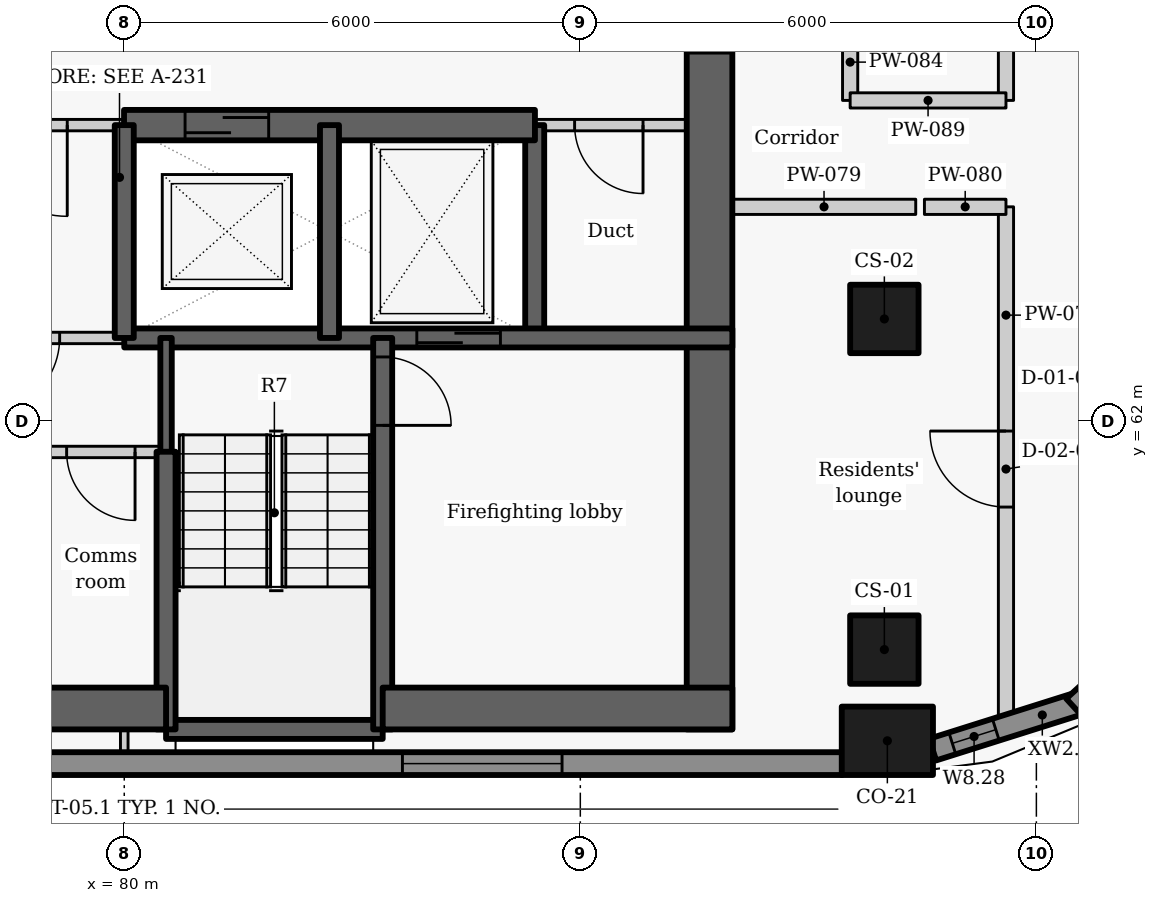
"""IFC4 building model, lengths in metres.
Left out: names, types, materials, properties, quantities, classifications, styles, units other than length and angle.
Written with IfcOpenShell. Run it as: python <this file> out.ifc"""

import sys

from ifc_helpers import new_model, si_unit, direction, frame, frame_2d, origin, origin_2d, place, context, subcontext, project, spatial, rectangle, extrude, element, fill, save


model = new_model("IFC4")
c1 = context("Model", 3, precision=1e-05, world=origin(), true_north=direction((0.0, 1.0)))
c2 = subcontext(c1, "Body", "Model", "MODEL_VIEW")
j1 = project(units=[si_unit("LENGTHUNIT", "METRE"), si_unit("PLANEANGLEUNIT", "RADIAN")], contexts=[c1])
p1 = place(None, origin())
s1 = spatial("IfcSite", under=j1, at=p1, CompositionType="ELEMENT")
p2 = place(p1, origin())
s2 = spatial("IfcBuilding", under=s1, at=p2, CompositionType="ELEMENT")
p3 = place(p2, frame((0.0, 0.0, 176.7)))
s3 = spatial("IfcBuildingStorey", under=s2, at=p3, CompositionType="ELEMENT", Elevation=176.7)
p4 = place(p3, frame((90.04, 57.8, 0.0), z_axis=(0.0, 0.0, 1.0), x_axis=(1.0, 0.0, 0.0)))
e1 = element("IfcColumn", 1, at=p4, inside=s3, PredefinedType="COLUMN", context=c2, shape_type="SweptSolid", body=[
    extrude(rectangle(XDim=1.2, YDim=0.9, at=origin_2d()), origin(), (0.0, 0.0, 1.0), 3.3),
])
for number, where, z_axis, x_axis in (
    (2, (90.0, 59.0, 0.0), (0.0, 0.0, 1.0), (0.0, 1.0, 0.0)),
    (3, (90.0, 63.35, 0.0), (0.0, 0.0, 1.0), (0.0, 1.0, 0.0)),
):
    element("IfcColumn", number, at=place(p3, frame(where, z_axis=z_axis, x_axis=x_axis)), inside=s3, PredefinedType="COLUMN", context=c2, shape_type="SweptSolid", body=[
        extrude(rectangle(XDim=0.9, YDim=0.9, at=origin_2d()), origin(), (0.0, 0.0, 1.0), 3.3),
    ])
p5 = place(p3, frame((70.551, 57.5, 0.0), z_axis=(0.0, 0.0, 1.0), x_axis=(1.0, 0.0, 0.0)))
e4 = element("IfcWall", 4, at=p5, inside=s3, PredefinedType="SOLIDWALL", context=c2, shape_type="SweptSolid", body=[
    extrude(rectangle(XDim=18.893, YDim=0.3, at=frame_2d((9.446, 0.0))), origin(), (0.0, 0.0, 1.0), 2.425),
])
p6 = place(p5, frame((3.687, 0.0, 0.9)))
e5 = element("IfcOpeningElement", 5, at=p6, cuts=e4, PredefinedType="OPENING", context=c2, shape_type="SweptSolid", body=[
    extrude(rectangle(XDim=2.1, YDim=1.1, at=frame_2d((1.05, 0.55))), frame((0.0, 0.16, 0.0), z_axis=(0.0, -1.0, 0.0), x_axis=(1.0, 0.0, 0.0)), (0.0, 0.0, 1.0), 0.32),
])
p7 = place(p5, frame((13.109, 0.0, 0.9)))
e6 = element("IfcOpeningElement", 6, at=p7, cuts=e4, PredefinedType="OPENING", context=c2, shape_type="SweptSolid", body=[
    extrude(rectangle(XDim=2.1, YDim=1.1, at=frame_2d((1.05, 0.55))), frame((0.0, 0.16, 0.0), z_axis=(0.0, -1.0, 0.0), x_axis=(1.0, 0.0, 0.0)), (0.0, 0.0, 1.0), 0.32),
])
p8 = place(p3, frame((90.636, 57.685, 0.0), z_axis=(0.0, 0.0, 1.0), x_axis=(0.95368324118, 0.300812691707, 0.0)))
e7 = element("IfcWall", 7, at=p8, inside=s3, PredefinedType="SOLIDWALL", context=c2, shape_type="SweptSolid", body=[
    extrude(rectangle(XDim=2.053, YDim=0.3, at=frame_2d((1.027, 0.0))), origin(), (0.0, 0.0, 1.0), 2.425),
])
p9 = place(p8, frame((0.271, 0.0, 0.9)))
e8 = element("IfcOpeningElement", 8, at=p9, cuts=e7, PredefinedType="OPENING", context=c2, shape_type="SweptSolid", body=[
    extrude(rectangle(XDim=0.6, YDim=1.1, at=frame_2d((0.3, 0.55))), frame((0.0, 0.16, 0.0), z_axis=(0.0, -1.0, 0.0), x_axis=(1.0, 0.0, 0.0)), (0.0, 0.0, 1.0), 0.32),
])
p10 = place(p3, frame((92.494, 58.244, 0.0), z_axis=(0.0, 0.0, 1.0), x_axis=(0.73764876128, 0.675184645102, 0.0)))
e9 = element("IfcWall", 9, at=p10, inside=s3, PredefinedType="SOLIDWALL", context=c2, shape_type="SweptSolid", body=[
    extrude(rectangle(XDim=2.048, YDim=0.3, at=frame_2d((1.024, 0.0))), origin(), (0.0, 0.0, 1.0), 2.425),
])
p11 = place(p3, frame((85.4, 63.1, -0.41), z_axis=(0.0, 0.0, 1.0), x_axis=(0.0, 1.0, 0.0)))
e10 = element("IfcWall", 10, at=p11, inside=s3, PredefinedType="SHEAR", context=c2, shape_type="SweptSolid", body=[
    extrude(rectangle(XDim=2.8, YDim=0.25, at=frame_2d((1.4, 0.0))), origin(), (0.0, 0.0, 1.0), 3.435),
])
p12 = place(p3, frame((87.7, 72.2, -0.41), z_axis=(0.0, 0.0, 1.0), x_axis=(0.0, -1.0, 0.0)))
e11 = element("IfcWall", 11, at=p12, inside=s3, PredefinedType="SHEAR", context=c2, shape_type="SweptSolid", body=[
    extrude(rectangle(XDim=14.25, YDim=0.6, at=frame_2d((7.125, 0.0))), origin(), (0.0, 0.0, 1.0), 3.435),
])
p13 = place(p12, frame((3.852, 0.0, 0.41)))
e12 = element("IfcOpeningElement", 12, at=p13, cuts=e11, PredefinedType="OPENING", context=c2, shape_type="SweptSolid", body=[
    extrude(rectangle(XDim=1.5, YDim=2.1, at=frame_2d((0.75, 1.05))), frame((0.0, 0.31, 0.0), z_axis=(0.0, -1.0, 0.0), x_axis=(1.0, 0.0, 0.0)), (0.0, 0.0, 1.0), 0.62),
])
p14 = place(p3, frame((80.003, 65.9, 0.0), z_axis=(0.0, 0.0, 1.0), x_axis=(-1.0, 0.0, 0.0)))
e13 = element("IfcWall", 13, at=p14, inside=s3, PredefinedType="PARTITIONING", context=c2, shape_type="SweptSolid", body=[
    extrude(rectangle(XDim=2.706, YDim=0.15, at=frame_2d((1.353, 0.0))), origin(), (0.0, 0.0, 1.0), 3.025),
])
p15 = place(p14, frame((0.753, 0.0, 0.0)))
e14 = element("IfcOpeningElement", 14, at=p15, cuts=e13, PredefinedType="OPENING", context=c2, shape_type="SweptSolid", body=[
    extrude(rectangle(XDim=1.2, YDim=2.1, at=frame_2d((0.6, 1.05))), frame((0.0, 0.085, 0.0), z_axis=(0.0, -1.0, 0.0), x_axis=(1.0, 0.0, 0.0)), (0.0, 0.0, 1.0), 0.17),
])
p16 = place(p3, frame((88.0, 65.9, 0.0), z_axis=(0.0, 0.0, 1.0), x_axis=(-1.0, 0.0, 0.0)))
e15 = element("IfcWall", 15, at=p16, inside=s3, PredefinedType="PARTITIONING", context=c2, shape_type="SweptSolid", body=[
    extrude(rectangle(XDim=2.603, YDim=0.15, at=frame_2d((1.302, 0.0))), origin(), (0.0, 0.0, 1.0), 3.025),
])
p17 = place(p16, frame((1.175, 0.0, 0.0)))
e16 = element("IfcOpeningElement", 16, at=p17, cuts=e15, PredefinedType="OPENING", context=c2, shape_type="SweptSolid", body=[
    extrude(rectangle(XDim=0.9, YDim=2.1, at=frame_2d((0.45, 1.05))), frame((0.0, 0.085, 0.0), z_axis=(0.0, -1.0, 0.0), x_axis=(1.0, 0.0, 0.0)), (0.0, 0.0, 1.0), 0.17),
])
p18 = place(p3, frame((79.997, 65.9, -0.41), z_axis=(0.0, 0.0, 1.0), x_axis=(1.0, 0.0, 0.0)))
e17 = element("IfcWall", 17, at=p18, inside=s3, PredefinedType="SHEAR", context=c2, shape_type="SweptSolid", body=[
    extrude(rectangle(XDim=5.406, YDim=0.4, at=frame_2d((2.703, 0.0))), origin(), (0.0, 0.0, 1.0), 3.435),
])
p19 = place(p18, frame((0.803, 0.0, 0.41)))
e18 = element("IfcOpeningElement", 18, at=p19, cuts=e17, PredefinedType="OPENING", context=c2, shape_type="SweptSolid", body=[
    extrude(rectangle(XDim=1.1, YDim=2.1, at=frame_2d((0.55, 1.05))), frame((0.0, 0.21, 0.0), z_axis=(0.0, -1.0, 0.0), x_axis=(1.0, 0.0, 0.0)), (0.0, 0.0, 1.0), 0.42),
])
p20 = place(p3, frame((80.0, 63.1, -0.41), z_axis=(0.0, 0.0, 1.0), x_axis=(1.0, 0.0, 0.0)))
e19 = element("IfcWall", 19, at=p20, inside=s3, PredefinedType="SHEAR", context=c2, shape_type="SweptSolid", body=[
    extrude(rectangle(XDim=8.0, YDim=0.25, at=frame_2d((4.0, 0.0))), origin(), (0.0, 0.0, 1.0), 3.435),
])
p21 = place(p20, frame((3.849, 0.0, 0.41)))
e20 = element("IfcOpeningElement", 20, at=p21, cuts=e19, PredefinedType="OPENING", context=c2, shape_type="SweptSolid", body=[
    extrude(rectangle(XDim=1.1, YDim=2.1, at=frame_2d((0.55, 1.05))), frame((0.0, 0.135, 0.0), z_axis=(0.0, -1.0, 0.0), x_axis=(1.0, 0.0, 0.0)), (0.0, 0.0, 1.0), 0.27),
])
p22 = place(p3, frame((80.0, 63.1, -0.41), z_axis=(0.0, 0.0, 1.0), x_axis=(0.0, 1.0, 0.0)))
e21 = element("IfcWall", 21, at=p22, inside=s3, PredefinedType="SHEAR", context=c2, shape_type="SweptSolid", body=[
    extrude(rectangle(XDim=2.8, YDim=0.25, at=frame_2d((1.4, 0.0))), origin(), (0.0, 0.0, 1.0), 3.435),
])
p23 = place(p3, frame((80.0, 63.1, 0.0), z_axis=(0.0, 0.0, 1.0), x_axis=(-1.0, 0.0, 0.0)))
e22 = element("IfcWall", 22, at=p23, inside=s3, PredefinedType="PARTITIONING", context=c2, shape_type="SweptSolid", body=[
    extrude(rectangle(XDim=2.7, YDim=0.15, at=frame_2d((1.35, 0.0))), origin(), (0.0, 0.0, 1.0), 3.025),
])
p24 = place(p23, frame((0.85, 0.0, 0.0)))
e23 = element("IfcOpeningElement", 23, at=p24, cuts=e22, PredefinedType="OPENING", context=c2, shape_type="SweptSolid", body=[
    extrude(rectangle(XDim=1.0, YDim=2.1, at=frame_2d((0.5, 1.05))), frame((0.0, 0.085, 0.0), z_axis=(0.0, -1.0, 0.0), x_axis=(1.0, 0.0, 0.0)), (0.0, 0.0, 1.0), 0.17),
])
p25 = place(p3, frame((82.7, 63.1, -0.41), z_axis=(0.0, 0.0, 1.0), x_axis=(0.0, 1.0, 0.0)))
e24 = element("IfcWall", 24, at=p25, inside=s3, PredefinedType="SHEAR", context=c2, shape_type="SweptSolid", body=[
    extrude(rectangle(XDim=2.8, YDim=0.25, at=frame_2d((1.4, 0.0))), origin(), (0.0, 0.0, 1.0), 3.435),
])
p26 = place(p3, frame((80.55, 57.95, 0.0), z_axis=(0.0, 0.0, 1.0), x_axis=(1.0, 0.0, 0.0)))
e25 = element("IfcWall", 25, at=p26, inside=s3, PredefinedType="SHEAR", context=c2, shape_type="SweptSolid", body=[
    extrude(rectangle(XDim=2.85, YDim=0.25, at=frame_2d((1.425, 0.0))), origin(), (0.0, 0.0, 1.0), 3.025),
])
p27 = place(p3, frame((83.4, 63.1, -0.41), z_axis=(0.0, 0.0, 1.0), x_axis=(0.0, -1.0, 0.0)))
e26 = element("IfcWall", 26, at=p27, inside=s3, PredefinedType="SHEAR", context=c2, shape_type="SweptSolid", body=[
    extrude(rectangle(XDim=5.15, YDim=0.25, at=frame_2d((2.575, 0.0))), origin(), (0.0, 0.0, 1.0), 3.435),
])
p28 = place(p27, frame((0.25, 0.0, 0.41)))
e27 = element("IfcOpeningElement", 27, at=p28, cuts=e26, PredefinedType="OPENING", context=c2, shape_type="SweptSolid", body=[
    extrude(rectangle(XDim=0.9, YDim=2.1, at=frame_2d((0.45, 1.05))), frame((0.0, 0.135, 0.0), z_axis=(0.0, -1.0, 0.0), x_axis=(1.0, 0.0, 0.0)), (0.0, 0.0, 1.0), 0.27),
])
p29 = place(p3, frame((80.55, 61.597, -0.41), z_axis=(0.0, 0.0, 1.0), x_axis=(0.0, 1.0, 0.0)))
e28 = element("IfcWall", 28, at=p29, inside=s3, PredefinedType="SHEAR", context=c2, shape_type="SweptSolid", body=[
    extrude(rectangle(XDim=1.503, YDim=0.15, at=frame_2d((0.751, 0.0))), origin(), (0.0, 0.0, 1.0), 3.435),
])
p30 = place(p3, frame((80.55, 57.95, -0.41), z_axis=(0.0, 0.0, 1.0), x_axis=(0.0, 1.0, 0.0)))
e29 = element("IfcWall", 29, at=p30, inside=s3, PredefinedType="SHEAR", context=c2, shape_type="SweptSolid", body=[
    extrude(rectangle(XDim=3.653, YDim=0.25, at=frame_2d((1.827, 0.0))), origin(), (0.0, 0.0, 1.0), 3.435),
])
p31 = place(p3, frame((75.35, 58.225, 0.0), z_axis=(0.0, 0.0, 1.0), x_axis=(1.0, 0.0, 0.0)))
e30 = element("IfcWall", 30, at=p31, inside=s3, PredefinedType="SHEAR", context=c2, shape_type="SweptSolid", body=[
    extrude(rectangle(XDim=5.2, YDim=0.55, at=frame_2d((2.6, 0.0))), origin(), (0.0, 0.0, 1.0), 3.025),
])
p32 = place(p3, frame((83.4, 58.225, 0.0), z_axis=(0.0, 0.0, 1.0), x_axis=(1.0, 0.0, 0.0)))
e31 = element("IfcWall", 31, at=p32, inside=s3, PredefinedType="SHEAR", context=c2, shape_type="SweptSolid", body=[
    extrude(rectangle(XDim=4.6, YDim=0.55, at=frame_2d((2.3, 0.0))), origin(), (0.0, 0.0, 1.0), 3.025),
])
p33 = place(p3, frame((80.55, 61.6, 0.0), z_axis=(0.0, 0.0, 1.0), x_axis=(-1.0, 0.0, 0.0)))
e32 = element("IfcWall", 32, at=p33, inside=s3, PredefinedType="PARTITIONING", context=c2, shape_type="SweptSolid", body=[
    extrude(rectangle(XDim=5.2, YDim=0.15, at=frame_2d((2.6, 0.0))), origin(), (0.0, 0.0, 1.0), 3.025),
])
p34 = place(p33, frame((3.866, 0.0, 0.0)))
e33 = element("IfcOpeningElement", 33, at=p34, cuts=e32, PredefinedType="OPENING", context=c2, shape_type="SweptSolid", body=[
    extrude(rectangle(XDim=0.9, YDim=2.1, at=frame_2d((0.45, 1.05))), frame((0.0, 0.085, 0.0), z_axis=(0.0, -1.0, 0.0), x_axis=(1.0, 0.0, 0.0)), (0.0, 0.0, 1.0), 0.17),
])
p35 = place(p33, frame((2.124, 0.0, 0.0)))
e34 = element("IfcOpeningElement", 34, at=p35, cuts=e32, PredefinedType="OPENING", context=c2, shape_type="SweptSolid", body=[
    extrude(rectangle(XDim=0.9, YDim=2.1, at=frame_2d((0.45, 1.05))), frame((0.0, 0.085, 0.0), z_axis=(0.0, -1.0, 0.0), x_axis=(1.0, 0.0, 0.0)), (0.0, 0.0, 1.0), 0.17),
])
p36 = place(p33, frame((0.408, 0.0, 0.0)))
e35 = element("IfcOpeningElement", 35, at=p36, cuts=e32, PredefinedType="OPENING", context=c2, shape_type="SweptSolid", body=[
    extrude(rectangle(XDim=0.9, YDim=2.1, at=frame_2d((0.45, 1.05))), frame((0.0, 0.085, 0.0), z_axis=(0.0, -1.0, 0.0), x_axis=(1.0, 0.0, 0.0)), (0.0, 0.0, 1.0), 0.17),
])
p37 = place(p3, frame((91.6, 57.926, 0.0), z_axis=(0.0, 0.0, 1.0), x_axis=(0.0, 1.0, 0.0)))
e36 = element("IfcWall", 36, at=p37, inside=s3, PredefinedType="PARTITIONING", context=c2, shape_type="SweptSolid", body=[
    extrude(rectangle(XDim=6.899, YDim=0.2, at=frame_2d((3.449, 0.0))), origin(), (0.0, 0.0, 1.0), 2.405),
])
p38 = place(p37, frame((2.949, 0.0, 0.0)))
e37 = element("IfcOpeningElement", 37, at=p38, cuts=e36, PredefinedType="OPENING", context=c2, shape_type="SweptSolid", body=[
    extrude(rectangle(XDim=1.0, YDim=2.1, at=frame_2d((0.5, 1.05))), frame((0.0, 0.11, 0.0), z_axis=(0.0, -1.0, 0.0), x_axis=(1.0, 0.0, 0.0)), (0.0, 0.0, 1.0), 0.22),
])
p39 = place(p3, frame((91.6, 66.225, 0.0), z_axis=(0.0, 0.0, 1.0), x_axis=(0.0, 1.0, 0.0)))
e38 = element("IfcWall", 38, at=p39, inside=s3, PredefinedType="PARTITIONING", context=c2, shape_type="SweptSolid", body=[
    extrude(rectangle(XDim=5.298, YDim=0.2, at=frame_2d((2.649, 0.0))), origin(), (0.0, 0.0, 1.0), 3.025),
])
p40 = place(p3, frame((88.0, 64.825, 0.0), z_axis=(0.0, 0.0, 1.0), x_axis=(1.0, 0.0, 0.0)))
e39 = element("IfcWall", 39, at=p40, inside=s3, PredefinedType="PARTITIONING", context=c2, shape_type="SweptSolid", body=[
    extrude(rectangle(XDim=2.413, YDim=0.2, at=frame_2d((1.207, 0.0))), origin(), (0.0, 0.0, 1.0), 2.505),
])
p41 = place(p3, frame((90.527, 64.825, 0.0), z_axis=(0.0, 0.0, 1.0), x_axis=(1.0, 0.0, 0.0)))
e40 = element("IfcWall", 40, at=p41, inside=s3, PredefinedType="PARTITIONING", context=c2, shape_type="SweptSolid", body=[
    extrude(rectangle(XDim=1.073, YDim=0.2, at=frame_2d((0.537, 0.0))), origin(), (0.0, 0.0, 1.0), 3.025),
])
p42 = place(p3, frame((89.55, 66.225, 0.0), z_axis=(0.0, 0.0, 1.0), x_axis=(0.0, 1.0, 0.0)))
e41 = element("IfcWall", 41, at=p42, inside=s3, PredefinedType="PARTITIONING", context=c2, shape_type="SweptSolid", body=[
    extrude(rectangle(XDim=1.008, YDim=0.2, at=frame_2d((0.504, 0.0))), origin(), (0.0, 0.0, 1.0), 3.025),
])
p43 = place(p3, frame((89.55, 66.225, 0.0), z_axis=(0.0, 0.0, 1.0), x_axis=(1.0, 0.0, 0.0)))
e42 = element("IfcWall", 42, at=p43, inside=s3, PredefinedType="PARTITIONING", context=c2, shape_type="SweptSolid", body=[
    extrude(rectangle(XDim=2.05, YDim=0.2, at=frame_2d((1.025, 0.0))), origin(), (0.0, 0.0, 1.0), 2.505),
])
p44 = place(p3, frame((80.0, 57.65, 0.0), z_axis=(0.0, 0.0, 1.0), x_axis=(0.0, 1.0, 0.0)))
e43 = element("IfcWall", 43, at=p44, inside=s3, PredefinedType="PARTITIONING", context=c2, shape_type="SweptSolid", body=[
    extrude(rectangle(XDim=0.3, YDim=0.1, at=frame_2d((0.15, 0.0))), origin(), (0.0, 0.0, 1.0), 3.025),
])
p45 = place(p7, origin())
e44 = element("IfcWindow", 44, at=p45, inside=s3, PartitioningType="SINGLE_PANEL", PredefinedType="WINDOW", context=c2, shape_type="SweptSolid", body=[
    extrude(rectangle(XDim=2.1, YDim=1.1, at=frame_2d((1.05, 0.55))), frame((0.0, 0.03, 0.0), z_axis=(0.0, -1.0, 0.0), x_axis=(1.0, 0.0, 0.0)), (0.0, 0.0, 1.0), 0.06),
])
fill(e6, e44)
p46 = place(p9, origin())
e45 = element("IfcWindow", 45, at=p46, inside=s3, PartitioningType="SINGLE_PANEL", PredefinedType="WINDOW", context=c2, shape_type="SweptSolid", body=[
    extrude(rectangle(XDim=0.6, YDim=1.1, at=frame_2d((0.3, 0.55))), frame((0.0, 0.03, 0.0), z_axis=(0.0, -1.0, 0.0), x_axis=(1.0, 0.0, 0.0)), (0.0, 0.0, 1.0), 0.06),
])
fill(e8, e45)
p47 = place(p15, origin())
e46 = element("IfcDoor", 46, at=p47, inside=s3, OperationType="DOUBLE_DOOR_SINGLE_SWING", PredefinedType="DOOR", context=c2, shape_type="SweptSolid", body=[
    extrude(rectangle(XDim=1.2, YDim=2.1, at=frame_2d((0.6, 1.05))), frame((0.0, 0.025, 0.0), z_axis=(0.0, -1.0, 0.0), x_axis=(1.0, 0.0, 0.0)), (0.0, 0.0, 1.0), 0.05),
])
fill(e14, e46)
p48 = place(p19, origin())
e47 = element("IfcDoor", 47, at=p48, inside=s3, OperationType="SLIDING_TO_LEFT", PredefinedType="DOOR", context=c2, shape_type="SweptSolid", body=[
    extrude(rectangle(XDim=1.1, YDim=2.1, at=frame_2d((0.55, 1.05))), frame((0.0, 0.025, 0.0), z_axis=(0.0, -1.0, 0.0), x_axis=(1.0, 0.0, 0.0)), (0.0, 0.0, 1.0), 0.05),
])
fill(e18, e47)
p49 = place(p21, origin())
e48 = element("IfcDoor", 48, at=p49, inside=s3, OperationType="SLIDING_TO_LEFT", PredefinedType="DOOR", context=c2, shape_type="SweptSolid", body=[
    extrude(rectangle(XDim=1.1, YDim=2.1, at=frame_2d((0.55, 1.05))), frame((0.0, 0.025, 0.0), z_axis=(0.0, -1.0, 0.0), x_axis=(1.0, 0.0, 0.0)), (0.0, 0.0, 1.0), 0.05),
])
fill(e20, e48)
p50 = place(p17, origin())
e49 = element("IfcDoor", 49, at=p50, inside=s3, OperationType="SINGLE_SWING_LEFT", PredefinedType="DOOR", context=c2, shape_type="SweptSolid", body=[
    extrude(rectangle(XDim=0.9, YDim=2.1, at=frame_2d((0.45, 1.05))), frame((0.0, 0.025, 0.0), z_axis=(0.0, -1.0, 0.0), x_axis=(1.0, 0.0, 0.0)), (0.0, 0.0, 1.0), 0.05),
])
fill(e16, e49)
p51 = place(p24, origin())
e50 = element("IfcDoor", 50, at=p51, inside=s3, OperationType="SINGLE_SWING_RIGHT", PredefinedType="DOOR", context=c2, shape_type="SweptSolid", body=[
    extrude(rectangle(XDim=1.0, YDim=2.1, at=frame_2d((0.5, 1.05))), frame((0.0, 0.025, 0.0), z_axis=(0.0, -1.0, 0.0), x_axis=(1.0, 0.0, 0.0)), (0.0, 0.0, 1.0), 0.05),
])
fill(e23, e50)
p52 = place(p36, origin())
e51 = element("IfcDoor", 51, at=p52, inside=s3, OperationType="SINGLE_SWING_LEFT", PredefinedType="DOOR", context=c2, shape_type="SweptSolid", body=[
    extrude(rectangle(XDim=0.9, YDim=2.1, at=frame_2d((0.45, 1.05))), frame((0.0, 0.025, 0.0), z_axis=(0.0, -1.0, 0.0), x_axis=(1.0, 0.0, 0.0)), (0.0, 0.0, 1.0), 0.05),
])
fill(e35, e51)
p53 = place(p28, origin())
e52 = element("IfcDoor", 52, at=p53, inside=s3, OperationType="SINGLE_SWING_RIGHT", PredefinedType="DOOR", context=c2, shape_type="SweptSolid", body=[
    extrude(rectangle(XDim=0.9, YDim=2.1, at=frame_2d((0.45, 1.05))), frame((0.0, 0.025, 0.0), z_axis=(0.0, -1.0, 0.0), x_axis=(1.0, 0.0, 0.0)), (0.0, 0.0, 1.0), 0.05),
])
fill(e27, e52)
p54 = place(p38, origin())
e53 = element("IfcDoor", 53, at=p54, inside=s3, OperationType="SINGLE_SWING_RIGHT", PredefinedType="DOOR", context=c2, shape_type="SweptSolid", body=[
    extrude(rectangle(XDim=1.0, YDim=2.1, at=frame_2d((0.5, 1.05))), frame((0.0, 0.025, 0.0), z_axis=(0.0, -1.0, 0.0), x_axis=(1.0, 0.0, 0.0)), (0.0, 0.0, 1.0), 0.05),
])
fill(e37, e53)
p55 = place(p13, origin())
e54 = element("IfcDoor", 54, at=p55, inside=s3, OperationType="DOUBLE_DOOR_SINGLE_SWING", PredefinedType="DOOR", context=c2, shape_type="SweptSolid", body=[
    extrude(rectangle(XDim=1.5, YDim=2.1, at=frame_2d((0.75, 1.05))), frame((0.0, 0.025, 0.0), z_axis=(0.0, -1.0, 0.0), x_axis=(1.0, 0.0, 0.0)), (0.0, 0.0, 1.0), 0.05),
])
fill(e12, e54)
save(model, sys.argv[1])
